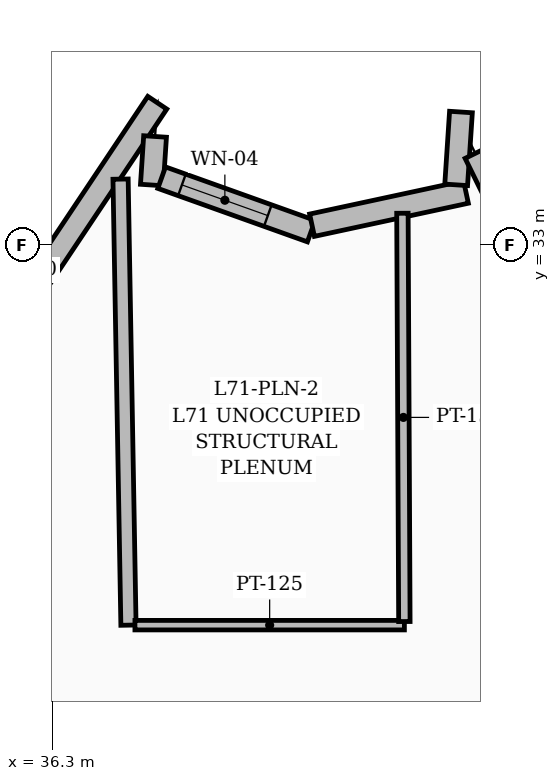
"""IFC4 building model, lengths in metres.
Left out: names, types, materials, properties, quantities, classifications, styles, units other than length and angle.
Written with IfcOpenShell. Run it as: python <this file> out.ifc"""

import sys

from ifc_helpers import new_model, si_unit, direction, frame, frame_2d, origin, place, context, subcontext, project, spatial, rectangle, extrude, element, fill, save


model = new_model("IFC4")
c1 = context("Model", 3, precision=1e-05, world=origin(), true_north=direction((0.0, 1.0)))
c2 = subcontext(c1, "Body", "Model", "MODEL_VIEW")
j1 = project(units=[si_unit("LENGTHUNIT", "METRE"), si_unit("PLANEANGLEUNIT", "RADIAN")], contexts=[c1])
p1 = place(None, origin())
s1 = spatial("IfcSite", under=j1, at=p1, CompositionType="ELEMENT")
p2 = place(p1, origin())
s2 = spatial("IfcBuilding", under=s1, at=p2, CompositionType="ELEMENT")
p3 = place(p2, frame((0.0, 0.0, 274.5)))
s3 = spatial("IfcBuildingStorey", under=s2, at=p3, CompositionType="ELEMENT", Elevation=274.5)
p4 = place(p3, frame((34.037, 29.417, 0.0), z_axis=(0.0, 0.0, 1.0), x_axis=(0.555189602117, 0.831723815759, 0.0)))
e1 = element("IfcWall", 1, at=p4, inside=s3, PredefinedType="SOLIDWALL", context=c2, shape_type="SweptSolid", body=[
    extrude(rectangle(XDim=6.561, YDim=0.3, at=frame_2d((3.28, 0.0))), origin(), (0.0, 0.0, 1.0), 3.5),
])
p5 = place(p4, frame((1.75, 0.0, 0.6)))
e2 = element("IfcOpeningElement", 2, at=p5, cuts=e1, PredefinedType="OPENING", context=c2, shape_type="SweptSolid", body=[
    extrude(rectangle(XDim=1.8, YDim=2.1, at=frame_2d((0.9, 1.05))), frame((0.0, 0.16, 0.0), z_axis=(0.0, -1.0, 0.0), x_axis=(1.0, 0.0, 0.0)), (0.0, 0.0, 1.0), 0.32),
])
p6 = place(p3, frame((37.65, 34.429, 0.0), z_axis=(0.0, 0.0, 1.0), x_axis=(-0.065607578869, -0.997845501866, 0.0)))
e3 = element("IfcWall", 3, at=p6, inside=s3, PredefinedType="SOLIDWALL", context=c2, shape_type="SweptSolid", body=[
    extrude(rectangle(XDim=0.64, YDim=0.3, at=frame_2d((0.32, 0.0))), origin(), (0.0, 0.0, 1.0), 3.5),
])
p7 = place(p3, frame((37.737, 33.887, 0.0), z_axis=(0.0, 0.0, 1.0), x_axis=(0.941665242227, -0.336550994028, 0.0)))
e4 = element("IfcWall", 4, at=p7, inside=s3, PredefinedType="SOLIDWALL", context=c2, shape_type="SweptSolid", body=[
    extrude(rectangle(XDim=2.09, YDim=0.3, at=frame_2d((1.045, 0.0))), origin(), (0.0, 0.0, 1.0), 3.5),
])
p8 = place(p7, frame((0.283, 0.0, 0.8)))
e5 = element("IfcOpeningElement", 5, at=p8, cuts=e4, PredefinedType="OPENING", context=c2, shape_type="SweptSolid", body=[
    extrude(rectangle(XDim=1.2, YDim=1.8, at=frame_2d((0.6, 0.9))), frame((0.0, 0.16, 0.0), z_axis=(0.0, -1.0, 0.0), x_axis=(1.0, 0.0, 0.0)), (0.0, 0.0, 1.0), 0.32),
])
p9 = place(p3, frame((39.715, 33.261, 0.0), z_axis=(0.0, 0.0, 1.0), x_axis=(0.977601927603, 0.210462517201, 0.0)))
e6 = element("IfcWall", 6, at=p9, inside=s3, PredefinedType="SOLIDWALL", context=c2, shape_type="SweptSolid", body=[
    extrude(rectangle(XDim=2.072, YDim=0.3, at=frame_2d((1.036, 0.0))), origin(), (0.0, 0.0, 1.0), 3.5),
])
p10 = place(p3, frame((41.611, 33.793, 0.0), z_axis=(0.0, 0.0, 1.0), x_axis=(0.065860770899, 0.997828822422, 0.0)))
e7 = element("IfcWall", 7, at=p10, inside=s3, PredefinedType="SOLIDWALL", context=c2, shape_type="SweptSolid", body=[
    extrude(rectangle(XDim=0.96, YDim=0.3, at=frame_2d((0.48, 0.0))), origin(), (0.0, 0.0, 1.0), 3.5),
])
p11 = place(p3, frame((41.864, 34.207, 0.0), z_axis=(0.0, 0.0, 1.0), x_axis=(0.441293527223, -0.897362815605, 0.0)))
e8 = element("IfcWall", 8, at=p11, inside=s3, PredefinedType="SOLIDWALL", context=c2, shape_type="SweptSolid", body=[
    extrude(rectangle(XDim=5.304, YDim=0.3, at=frame_2d((2.652, 0.0))), origin(), (0.0, 0.0, 1.0), 3.5),
])
p12 = place(p11, frame((1.26, 0.0, 0.55)))
e9 = element("IfcOpeningElement", 9, at=p12, cuts=e8, PredefinedType="OPENING", context=c2, shape_type="SweptSolid", body=[
    extrude(rectangle(XDim=2.1, YDim=2.4, at=frame_2d((1.05, 1.2))), frame((0.0, 0.16, 0.0), z_axis=(0.0, -1.0, 0.0), x_axis=(1.0, 0.0, 0.0)), (0.0, 0.0, 1.0), 0.32),
])
p13 = place(p3, frame((37.3, 28.0, 0.0), z_axis=(0.0, 0.0, 1.0), x_axis=(-0.017721368952, 0.999842964211, 0.0)))
e10 = element("IfcWall", 10, at=p13, inside=s3, PredefinedType="PARTITIONING", context=c2, shape_type="SweptSolid", body=[
    extrude(rectangle(XDim=5.869, YDim=0.2, at=frame_2d((2.935, 0.0))), origin(), (0.0, 0.0, 1.0), 2.691),
])
p14 = place(p3, frame((40.93, 28.0, 0.0), z_axis=(0.0, 0.0, 1.0), x_axis=(-1.0, 0.0, 0.0)))
e11 = element("IfcWall", 11, at=p14, inside=s3, PredefinedType="PARTITIONING", context=c2, shape_type="SweptSolid", body=[
    extrude(rectangle(XDim=3.545, YDim=0.125, at=frame_2d((1.772, 0.0))), origin(), (0.0, 0.0, 1.0), 3.5),
])
p15 = place(p3, frame((40.904, 33.419, 0.0), z_axis=(0.0, 0.0, 1.0), x_axis=(0.00477245599, -0.999988611767, 0.0)))
e12 = element("IfcWall", 12, at=p15, inside=s3, PredefinedType="PARTITIONING", context=c2, shape_type="SweptSolid", body=[
    extrude(rectangle(XDim=5.371, YDim=0.15, at=frame_2d((2.686, 0.0))), origin(), (0.0, 0.0, 1.0), 2.691),
])
p16 = place(p8, origin())
e13 = element("IfcWindow", 13, at=p16, inside=s3, PartitioningType="SINGLE_PANEL", PredefinedType="WINDOW", context=c2, shape_type="SweptSolid", body=[
    extrude(rectangle(XDim=1.2, YDim=1.8, at=frame_2d((0.6, 0.9))), frame((0.0, 0.03, 0.0), z_axis=(0.0, -1.0, 0.0), x_axis=(1.0, 0.0, 0.0)), (0.0, 0.0, 1.0), 0.06),
])
fill(e5, e13)
save(model, sys.argv[1])
